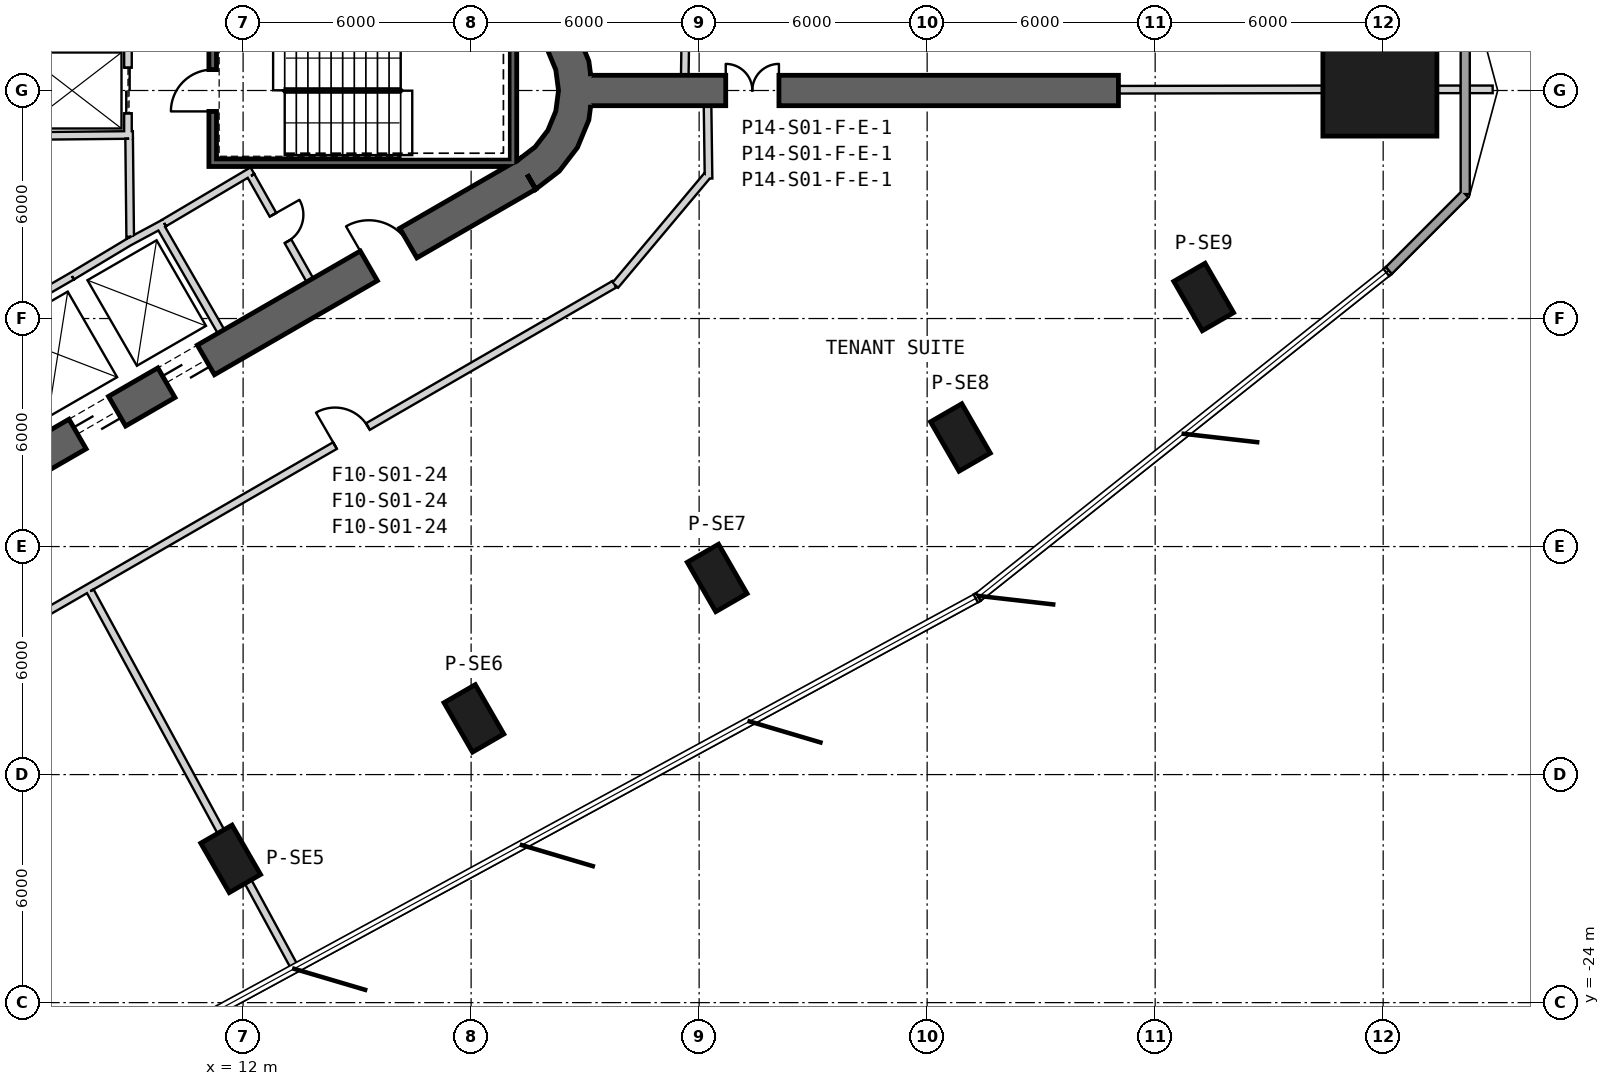
"""IFC4 building model, lengths in metres.
Left out: names, types, materials, properties, quantities, classifications, styles, units other than length and angle.
Written with IfcOpenShell. Run it as: python <this file> out.ifc"""

import sys

from ifc_helpers import new_model, si_unit, direction, frame, frame_2d, origin, origin_2d, place, context, subcontext, project, spatial, polyline, rectangle, outline, extrude, element, fill, save


model = new_model("IFC4")
c1 = context("Model", 3, precision=1e-05, world=origin(), true_north=direction((0.0, 1.0)))
c2 = subcontext(c1, "Body", "Model", "MODEL_VIEW")
j1 = project(units=[si_unit("LENGTHUNIT", "METRE"), si_unit("PLANEANGLEUNIT", "RADIAN")], contexts=[c1])
p1 = place(None, origin())
s1 = spatial("IfcSite", under=j1, at=p1, CompositionType="ELEMENT")
p2 = place(p1, origin())
s2 = spatial("IfcBuilding", under=s1, at=p2, CompositionType="ELEMENT")
p3 = place(p2, frame((0.0, 0.0, 57.8)))
s3 = spatial("IfcBuildingStorey", under=s2, at=p3, CompositionType="ELEMENT", Elevation=57.8)
p4 = place(p3, frame((41.914, 0.0, 0.0), z_axis=(0.0, 0.0, 1.0), x_axis=(1.0, 0.0, 0.0)))
e1 = element("IfcColumn", 1, at=p4, inside=s3, PredefinedType="COLUMN", context=c2, shape_type="SweptSolid", body=[
    extrude(rectangle(XDim=3.0, YDim=2.4, at=origin_2d()), origin(), (0.0, 0.0, 1.0), 4.1),
])
for number, where, z_axis, x_axis in (
    (2, (11.672, -20.217, 0.0), (0.0, 0.0, 1.0), (0.5, -0.866, 0.0)),
    (3, (18.073, -16.521, 0.0), (0.0, 0.0, 1.0), (0.5, -0.866, 0.0)),
    (4, (24.475, -12.825, 0.0), (0.0, 0.0, 1.0), (0.5, -0.866, 0.0)),
    (5, (30.876, -9.13, 0.0), (0.0, 0.0, 1.0), (0.5, -0.866, 0.0)),
    (6, (37.277, -5.434, 0.0), (0.0, 0.0, 1.0), (0.5, -0.866, 0.0)),
):
    element("IfcColumn", number, at=place(p3, frame(where, z_axis=z_axis, x_axis=x_axis)), inside=s3, PredefinedType="COLUMN", context=c2, shape_type="SweptSolid", body=[
        extrude(rectangle(XDim=1.5, YDim=0.95, at=origin_2d()), origin(), (0.0, 0.0, 1.0), 4.1),
    ])
p5 = place(p3, frame((-7.825, -17.97, 0.0), z_axis=(0.0, 0.0, 1.0), x_axis=(0.866028369851, 0.499994862586, 0.0)))
e7 = element("IfcWall", 7, at=p5, inside=s3, PredefinedType="SHEAR", context=c2, shape_type="SweptSolid", body=[
    extrude(rectangle(XDim=31.523, YDim=0.9, at=frame_2d((15.762, 0.0))), origin(), (0.0, 0.0, 1.0), 4.1),
])
p6 = place(p5, frame((7.062, 0.0, 0.0)))
e8 = element("IfcOpeningElement", 8, at=p6, cuts=e7, PredefinedType="OPENING", context=c2, shape_type="SweptSolid", body=[
    extrude(rectangle(XDim=1.2, YDim=2.4, at=frame_2d((0.6, 1.2))), frame((0.0, 0.46, 0.0), z_axis=(0.0, -1.0, 0.0), x_axis=(1.0, 0.0, 0.0)), (0.0, 0.0, 1.0), 0.92),
])
p7 = place(p5, frame((9.762, 0.0, 0.0)))
e9 = element("IfcOpeningElement", 9, at=p7, cuts=e7, PredefinedType="OPENING", context=c2, shape_type="SweptSolid", body=[
    extrude(rectangle(XDim=1.2, YDim=2.4, at=frame_2d((0.6, 1.2))), frame((0.0, 0.46, 0.0), z_axis=(0.0, -1.0, 0.0), x_axis=(1.0, 0.0, 0.0)), (0.0, 0.0, 1.0), 0.92),
])
p8 = place(p5, frame((12.462, 0.0, 0.0)))
e10 = element("IfcOpeningElement", 10, at=p8, cuts=e7, PredefinedType="OPENING", context=c2, shape_type="SweptSolid", body=[
    extrude(rectangle(XDim=1.2, YDim=2.4, at=frame_2d((0.6, 1.2))), frame((0.0, 0.46, 0.0), z_axis=(0.0, -1.0, 0.0), x_axis=(1.0, 0.0, 0.0)), (0.0, 0.0, 1.0), 0.92),
])
p9 = place(p5, frame((15.162, 0.0, 0.0)))
e11 = element("IfcOpeningElement", 11, at=p9, cuts=e7, PredefinedType="OPENING", context=c2, shape_type="SweptSolid", body=[
    extrude(rectangle(XDim=1.2, YDim=2.4, at=frame_2d((0.6, 1.2))), frame((0.0, 0.46, 0.0), z_axis=(0.0, -1.0, 0.0), x_axis=(1.0, 0.0, 0.0)), (0.0, 0.0, 1.0), 0.92),
])
p10 = place(p5, frame((17.862, 0.0, 0.0)))
e12 = element("IfcOpeningElement", 12, at=p10, cuts=e7, PredefinedType="OPENING", context=c2, shape_type="SweptSolid", body=[
    extrude(rectangle(XDim=1.2, YDim=2.4, at=frame_2d((0.6, 1.2))), frame((0.0, 0.46, 0.0), z_axis=(0.0, -1.0, 0.0), x_axis=(1.0, 0.0, 0.0)), (0.0, 0.0, 1.0), 0.92),
])
p11 = place(p5, frame((20.562, 0.0, 0.0)))
e13 = element("IfcOpeningElement", 13, at=p11, cuts=e7, PredefinedType="OPENING", context=c2, shape_type="SweptSolid", body=[
    extrude(rectangle(XDim=1.2, YDim=2.4, at=frame_2d((0.6, 1.2))), frame((0.0, 0.46, 0.0), z_axis=(0.0, -1.0, 0.0), x_axis=(1.0, 0.0, 0.0)), (0.0, 0.0, 1.0), 0.92),
])
p12 = place(p5, frame((26.712, 0.0, 0.0)))
e14 = element("IfcOpeningElement", 14, at=p12, cuts=e7, PredefinedType="OPENING", context=c2, shape_type="SweptSolid", body=[
    extrude(rectangle(XDim=1.2, YDim=2.4, at=frame_2d((0.6, 1.2))), frame((0.0, 0.46, 0.0), z_axis=(0.0, -1.0, 0.0), x_axis=(1.0, 0.0, 0.0)), (0.0, 0.0, 1.0), 0.92),
])
p13 = place(p5, frame((3.612, 0.0, 0.0)))
e15 = element("IfcOpeningElement", 15, at=p13, cuts=e7, PredefinedType="OPENING", context=c2, shape_type="SweptSolid", body=[
    extrude(rectangle(XDim=1.2, YDim=2.4, at=frame_2d((0.6, 1.2))), frame((0.0, 0.46, 0.0), z_axis=(0.0, -1.0, 0.0), x_axis=(1.0, 0.0, 0.0)), (0.0, 0.0, 1.0), 0.92),
])
p14 = place(p3, origin())
e16 = element("IfcWall", 16, at=p14, inside=s3, PredefinedType="SHEAR", context=c2, shape_type="SweptSolid", body=[
    extrude(outline(polyline([(19.7, -2.598), (20.321, -2.121), (20.798, -1.5), (21.098, -0.777), (21.2, 0.0), (21.098, 0.777), (20.798, 1.5), (20.321, 2.121), (19.7, 2.598), (19.25, 1.819), (19.685, 1.485), (20.019, 1.05), (20.229, 0.543), (20.3, 0.0), (20.229, -0.543), (20.019, -1.05), (19.685, -1.485), (19.25, -1.819), (19.7, -2.598)])), origin(), (0.0, 0.0, 1.0), 4.1),
])
p15 = place(p3, frame((21.15, 0.0, 0.0), z_axis=(0.0, 0.0, 1.0), x_axis=(1.0, 0.0, 0.0)))
e17 = element("IfcWall", 17, at=p15, inside=s3, PredefinedType="SHEAR", context=c2, shape_type="SweptSolid", body=[
    extrude(rectangle(XDim=13.884, YDim=0.8, at=frame_2d((6.942, 0.0))), origin(), (0.0, 0.0, 1.0), 4.1),
])
p16 = place(p15, frame((3.55, 0.0, 0.0)))
e18 = element("IfcOpeningElement", 18, at=p16, cuts=e17, PredefinedType="OPENING", context=c2, shape_type="SweptSolid", body=[
    extrude(rectangle(XDim=1.4, YDim=2.4, at=frame_2d((0.7, 1.2))), frame((0.0, 0.41, 0.0), z_axis=(0.0, -1.0, 0.0), x_axis=(1.0, 0.0, 0.0)), (0.0, 0.0, 1.0), 0.82),
])
p17 = place(p3, frame((42.146, -4.739, 0.0), z_axis=(0.0, 0.0, 1.0), x_axis=(0.707106781187, 0.707106781187, 0.0)))
e19 = element("IfcWall", 19, at=p17, inside=s3, PredefinedType="SOLIDWALL", context=c2, shape_type="SweptSolid", body=[
    extrude(rectangle(XDim=2.847, YDim=0.24, at=frame_2d((1.424, 0.0))), origin(), (0.0, 0.0, 1.0), 3.8),
])
p18 = place(p3, frame((44.159, -2.726, 0.0), z_axis=(0.0, 0.0, 1.0), x_axis=(0.0, 1.0, 0.0)))
e20 = element("IfcWall", 20, at=p18, inside=s3, PredefinedType="SOLIDWALL", context=c2, shape_type="SweptSolid", body=[
    extrude(rectangle(XDim=5.451, YDim=0.24, at=frame_2d((2.726, 0.0))), origin(), (0.0, 0.0, 1.0), 3.8),
])
p19 = place(p3, frame((0.483, -8.936, 0.0), z_axis=(0.0, 0.0, 1.0), x_axis=(0.866030989016, 0.499990325971, 0.0)))
e21 = element("IfcWall", 21, at=p19, inside=s3, PredefinedType="PLUMBINGWALL", context=c2, shape_type="SweptSolid", body=[
    extrude(rectangle(XDim=8.1, YDim=0.2, at=frame_2d((4.05, 0.0))), origin(), (0.0, 0.0, 1.0), 3.8),
])
p20 = place(p3, frame((9.795, -3.525, 0.0), z_axis=(0.0, 0.0, 1.0), x_axis=(0.499984717929, -0.866034226713, 0.0)))
e22 = element("IfcWall", 22, at=p20, inside=s3, PredefinedType="PLUMBINGWALL", context=c2, shape_type="SweptSolid", body=[
    extrude(rectangle(XDim=3.25, YDim=0.2, at=frame_2d((1.625, 0.0))), origin(), (0.0, 0.0, 1.0), 3.8),
])
p21 = place(p3, frame((8.974, -3.999, 0.0), z_axis=(0.0, 0.0, 1.0), x_axis=(0.880907015104, 0.473289373154, 0.0)))
e23 = element("IfcWall", 23, at=p21, inside=s3, PredefinedType="PLUMBINGWALL", context=c2, shape_type="SweptSolid", body=[
    extrude(rectangle(XDim=1.078, YDim=0.2, at=frame_2d((0.539, 0.0))), origin(), (0.0, 0.0, 1.0), 3.8),
])
p22 = place(p3, frame((7.497, -4.886, 0.0), z_axis=(0.0, 0.0, 1.0), x_axis=(0.857516281273, 0.51445682749, 0.0)))
e24 = element("IfcWall", 24, at=p22, inside=s3, PredefinedType="PLUMBINGWALL", context=c2, shape_type="SweptSolid", body=[
    extrude(rectangle(XDim=1.845, YDim=0.2, at=frame_2d((0.922, 0.0))), origin(), (0.0, 0.0, 1.0), 3.8),
])
p23 = place(p3, frame((19.1, -2.0, -0.3), z_axis=(0.0, 0.0, 1.0), x_axis=(0.0, 1.0, 0.0)))
e25 = element("IfcWall", 25, at=p23, inside=s3, PredefinedType="SHEAR", context=c2, shape_type="SweptSolid", body=[
    extrude(rectangle(XDim=3.8, YDim=0.2, at=frame_2d((1.9, 0.0))), origin(), (0.0, 0.0, 1.0), 4.1),
])
p24 = place(p3, frame((11.1, -1.9, -0.3), z_axis=(0.0, 0.0, 1.0), x_axis=(1.0, 0.0, 0.0)))
e26 = element("IfcWall", 26, at=p24, inside=s3, PredefinedType="SHEAR", context=c2, shape_type="SweptSolid", body=[
    extrude(rectangle(XDim=7.9, YDim=0.2, at=frame_2d((3.95, 0.0))), origin(), (0.0, 0.0, 1.0), 4.1),
])
p25 = place(p3, frame((11.2, -1.8, -0.3), z_axis=(0.0, 0.0, 1.0), x_axis=(0.0, 1.0, 0.0)))
e27 = element("IfcWall", 27, at=p25, inside=s3, PredefinedType="SHEAR", context=c2, shape_type="SweptSolid", body=[
    extrude(rectangle(XDim=3.6, YDim=0.2, at=frame_2d((1.8, 0.0))), origin(), (0.0, 0.0, 1.0), 4.1),
])
p26 = place(p25, frame((1.25, 0.0, 0.3)))
e28 = element("IfcOpeningElement", 28, at=p26, cuts=e27, PredefinedType="OPENING", context=c2, shape_type="SweptSolid", body=[
    extrude(rectangle(XDim=1.1, YDim=2.1, at=frame_2d((0.55, 1.05))), frame((0.0, 0.11, 0.0), z_axis=(0.0, -1.0, 0.0), x_axis=(1.0, 0.0, 0.0)), (0.0, 0.0, 1.0), 0.22),
])
p27 = place(p3, frame((8.97, 1.2, 0.0), z_axis=(0.0, 0.0, 1.0), x_axis=(0.0, -1.0, 0.0)))
e29 = element("IfcWall", 29, at=p27, inside=s3, PredefinedType="PLUMBINGWALL", context=c2, shape_type="SweptSolid", body=[
    extrude(rectangle(XDim=2.4, YDim=0.2, at=frame_2d((1.2, 0.0))), origin(), (0.0, 0.0, 1.0), 3.8),
])
p28 = place(p27, frame((0.6, 0.0, 0.0)))
e30 = element("IfcOpeningElement", 30, at=p28, cuts=e29, PredefinedType="OPENING", context=c2, shape_type="SweptSolid", body=[
    extrude(rectangle(XDim=1.2, YDim=2.4, at=frame_2d((0.6, 1.2))), frame((0.0, 0.11, 0.0), z_axis=(0.0, -1.0, 0.0), x_axis=(1.0, 0.0, 0.0)), (0.0, 0.0, 1.0), 0.22),
])
p29 = place(p3, frame((9.1, -1.169, 0.0), z_axis=(0.0, 0.0, 1.0), x_axis=(-0.999949988, -0.010001074852, 0.0)))
e31 = element("IfcWall", 31, at=p29, inside=s3, PredefinedType="PLUMBINGWALL", context=c2, shape_type="SweptSolid", body=[
    extrude(rectangle(XDim=3.1, YDim=0.2, at=frame_2d((1.55, 0.0))), origin(), (0.0, 0.0, 1.0), 3.8),
])
p30 = place(p3, frame((12.245, -2.109, 0.0), z_axis=(0.0, 0.0, 1.0), x_axis=(-0.860414880418, -0.509594185166, 0.0)))
e32 = element("IfcWall", 32, at=p30, inside=s3, PredefinedType="PARTITIONING", context=c2, shape_type="SweptSolid", body=[
    extrude(rectangle(XDim=2.7, YDim=0.2, at=frame_2d((1.35, 0.0))), origin(), (0.0, 0.0, 1.0), 3.8),
])
p31 = place(p3, frame((13.758, -4.99, 0.0), z_axis=(0.0, 0.0, 1.0), x_axis=(-0.491993409184, 0.87059892334, 0.0)))
e33 = element("IfcWall", 33, at=p31, inside=s3, PredefinedType="PARTITIONING", context=c2, shape_type="SweptSolid", body=[
    extrude(rectangle(XDim=3.15, YDim=0.2, at=frame_2d((1.575, 0.0))), origin(), (0.0, 0.0, 1.0), 3.8),
])
p32 = place(p31, frame((1.175, 0.0, 0.0)))
e34 = element("IfcOpeningElement", 34, at=p32, cuts=e33, PredefinedType="OPENING", context=c2, shape_type="SweptSolid", body=[
    extrude(rectangle(XDim=0.8, YDim=2.1, at=frame_2d((0.4, 1.05))), frame((0.0, 0.11, 0.0), z_axis=(0.0, -1.0, 0.0), x_axis=(1.0, 0.0, 0.0)), (0.0, 0.0, 1.0), 0.22),
])
p33 = place(p3, frame((9.029, -3.851, 0.0), z_axis=(0.0, 0.0, 1.0), x_axis=(-0.010784614026, 0.999941844359, 0.0)))
e35 = element("IfcWall", 35, at=p33, inside=s3, PredefinedType="PARTITIONING", context=c2, shape_type="SweptSolid", body=[
    extrude(rectangle(XDim=2.581, YDim=0.2, at=frame_2d((1.291, 0.0))), origin(), (0.0, 0.0, 1.0), 3.8),
])
p34 = place(p3, frame((23.622, 0.4, 0.0), z_axis=(0.0, 0.0, 1.0), x_axis=(0.015125657972, 0.999885600692, 0.0)))
e36 = element("IfcWall", 36, at=p34, inside=s3, PredefinedType="PARTITIONING", context=c2, shape_type="SweptSolid", body=[
    extrude(rectangle(XDim=1.533, YDim=0.2, at=frame_2d((0.767, 0.0))), origin(), (0.0, 0.0, 1.0), 3.8),
])
p35 = place(p3, frame((24.248, -2.317, 0.0), z_axis=(0.0, 0.0, 1.0), x_axis=(-0.013627571522, 0.999907140336, 0.0)))
e37 = element("IfcWall", 37, at=p35, inside=s3, PredefinedType="PARTITIONING", context=c2, shape_type="SweptSolid", body=[
    extrude(rectangle(XDim=1.917, YDim=0.2, at=frame_2d((0.958, 0.0))), origin(), (0.0, 0.0, 1.0), 3.8),
])
p36 = place(p3, frame((21.793, -5.124, 0.0), z_axis=(0.0, 0.0, 1.0), x_axis=(0.642787733653, 0.766044339098, 0.0)))
e38 = element("IfcWall", 38, at=p36, inside=s3, PredefinedType="PARTITIONING", context=c2, shape_type="SweptSolid", body=[
    extrude(rectangle(XDim=3.767, YDim=0.2, at=frame_2d((1.884, 0.0))), origin(), (0.0, 0.0, 1.0), 2.88),
])
p37 = place(p3, frame((-6.644, -21.503, 0.0), z_axis=(0.0, 0.0, 1.0), x_axis=(0.866025615729, 0.499999632902, 0.0)))
e39 = element("IfcWall", 39, at=p37, inside=s3, PredefinedType="PARTITIONING", context=c2, shape_type="SweptSolid", body=[
    extrude(rectangle(XDim=32.811, YDim=0.2, at=frame_2d((16.405, 0.0))), origin(), (0.0, 0.0, 1.0), 2.98),
])
p38 = place(p37, frame((24.32, 0.0, 0.0)))
e40 = element("IfcOpeningElement", 40, at=p38, cuts=e39, PredefinedType="OPENING", context=c2, shape_type="SweptSolid", body=[
    extrude(rectangle(XDim=1.0, YDim=2.1, at=frame_2d((0.5, 1.05))), frame((0.0, 0.11, 0.0), z_axis=(0.0, -1.0, 0.0), x_axis=(1.0, 0.0, 0.0)), (0.0, 0.0, 1.0), 0.22),
])
p39 = place(p37, frame((7.965, 0.0, 0.0)))
e41 = element("IfcOpeningElement", 41, at=p39, cuts=e39, PredefinedType="OPENING", context=c2, shape_type="SweptSolid", body=[
    extrude(rectangle(XDim=1.0, YDim=2.1, at=frame_2d((0.5, 1.05))), frame((0.0, 0.11, 0.0), z_axis=(0.0, -1.0, 0.0), x_axis=(1.0, 0.0, 0.0)), (0.0, 0.0, 1.0), 0.22),
])
p40 = place(p3, frame((35.034, 0.02, 0.0), z_axis=(0.0, 0.0, 1.0), x_axis=(0.999998268947, 0.001860672976, 0.0)))
e42 = element("IfcWall", 42, at=p40, inside=s3, PredefinedType="PARTITIONING", context=c2, shape_type="SweptSolid", body=[
    extrude(rectangle(XDim=5.38, YDim=0.2, at=frame_2d((2.69, 0.0))), origin(), (0.0, 0.0, 1.0), 3.37),
])
p41 = place(p3, frame((43.414, 0.03, 0.0), z_axis=(0.0, 0.0, 1.0), x_axis=(1.0, 0.0, 0.0)))
e43 = element("IfcWall", 43, at=p41, inside=s3, PredefinedType="PARTITIONING", context=c2, shape_type="SweptSolid", body=[
    extrude(rectangle(XDim=0.625, YDim=0.2, at=frame_2d((0.313, 0.0))), origin(), (0.0, 0.0, 1.0), 3.8),
])
p42 = place(p3, frame((44.279, 0.03, 0.0), z_axis=(0.0, 0.0, 1.0), x_axis=(1.0, 0.0, 0.0)))
e44 = element("IfcWall", 44, at=p42, inside=s3, PredefinedType="PARTITIONING", context=c2, shape_type="SweptSolid", body=[
    extrude(rectangle(XDim=0.602, YDim=0.2, at=frame_2d((0.301, 0.0))), origin(), (0.0, 0.0, 1.0), 3.8),
])
p43 = place(p3, frame((7.979, -13.176, 0.0), z_axis=(0.0, 0.0, 1.0), x_axis=(0.477371038841, -0.878701821596, 0.0)))
e45 = element("IfcWall", 45, at=p43, inside=s3, PredefinedType="PARTITIONING", context=c2, shape_type="SweptSolid", body=[
    extrude(rectangle(XDim=11.289, YDim=0.2, at=frame_2d((5.645, 0.0))), origin(), (0.0, 0.0, 1.0), 3.08),
])
p44 = place(p26, origin())
e46 = element("IfcDoor", 46, at=p44, inside=s3, OperationType="SINGLE_SWING_LEFT", PredefinedType="USERDEFINED", context=c2, shape_type="SweptSolid", body=[
    extrude(rectangle(XDim=1.1, YDim=2.1, at=frame_2d((0.55, 1.05))), frame((0.0, 0.025, 0.0), z_axis=(0.0, -1.0, 0.0), x_axis=(1.0, 0.0, 0.0)), (0.0, 0.0, 1.0), 0.05),
])
fill(e28, e46)
p45 = place(p28, origin())
e47 = element("IfcDoor", 47, at=p45, inside=s3, OperationType="SLIDING_TO_LEFT", PredefinedType="USERDEFINED", context=c2, shape_type="SweptSolid", body=[
    extrude(rectangle(XDim=1.2, YDim=2.4, at=frame_2d((0.6, 1.2))), frame((0.0, 0.025, 0.0), z_axis=(0.0, -1.0, 0.0), x_axis=(1.0, 0.0, 0.0)), (0.0, 0.0, 1.0), 0.05),
])
fill(e30, e47)
p46 = place(p32, origin())
e48 = element("IfcDoor", 48, at=p46, inside=s3, OperationType="SINGLE_SWING_LEFT", PredefinedType="USERDEFINED", context=c2, shape_type="SweptSolid", body=[
    extrude(rectangle(XDim=0.8, YDim=2.1, at=frame_2d((0.4, 1.05))), frame((0.0, 0.025, 0.0), z_axis=(0.0, -1.0, 0.0), x_axis=(1.0, 0.0, 0.0)), (0.0, 0.0, 1.0), 0.05),
])
fill(e34, e48)
p47 = place(p38, origin())
e49 = element("IfcDoor", 49, at=p47, inside=s3, OperationType="SINGLE_SWING_RIGHT", PredefinedType="USERDEFINED", context=c2, shape_type="SweptSolid", body=[
    extrude(rectangle(XDim=1.0, YDim=2.1, at=frame_2d((0.5, 1.05))), frame((0.0, 0.025, 0.0), z_axis=(0.0, -1.0, 0.0), x_axis=(1.0, 0.0, 0.0)), (0.0, 0.0, 1.0), 0.05),
])
fill(e40, e49)
p48 = place(p10, origin())
e50 = element("IfcDoor", 50, at=p48, inside=s3, OperationType="SLIDING_TO_LEFT", PredefinedType="USERDEFINED", context=c2, shape_type="SweptSolid", body=[
    extrude(rectangle(XDim=1.2, YDim=2.4, at=frame_2d((0.6, 1.2))), frame((0.0, 0.025, 0.0), z_axis=(0.0, -1.0, 0.0), x_axis=(1.0, 0.0, 0.0)), (0.0, 0.0, 1.0), 0.05),
])
fill(e12, e50)
p49 = place(p11, origin())
e51 = element("IfcDoor", 51, at=p49, inside=s3, OperationType="SLIDING_TO_LEFT", PredefinedType="USERDEFINED", context=c2, shape_type="SweptSolid", body=[
    extrude(rectangle(XDim=1.2, YDim=2.4, at=frame_2d((0.6, 1.2))), frame((0.0, 0.025, 0.0), z_axis=(0.0, -1.0, 0.0), x_axis=(1.0, 0.0, 0.0)), (0.0, 0.0, 1.0), 0.05),
])
fill(e13, e51)
p50 = place(p12, origin())
e52 = element("IfcDoor", 52, at=p50, inside=s3, OperationType="SINGLE_SWING_RIGHT", PredefinedType="USERDEFINED", context=c2, shape_type="SweptSolid", body=[
    extrude(rectangle(XDim=1.2, YDim=2.4, at=frame_2d((0.6, 1.2))), frame((0.0, 0.025, 0.0), z_axis=(0.0, -1.0, 0.0), x_axis=(1.0, 0.0, 0.0)), (0.0, 0.0, 1.0), 0.05),
])
fill(e14, e52)
p51 = place(p16, origin())
e53 = element("IfcDoor", 53, at=p51, inside=s3, OperationType="DOUBLE_DOOR_SINGLE_SWING", PredefinedType="NOTDEFINED", context=c2, shape_type="SweptSolid", body=[
    extrude(rectangle(XDim=1.4, YDim=2.4, at=frame_2d((0.7, 1.2))), frame((0.0, 0.025, 0.0), z_axis=(0.0, -1.0, 0.0), x_axis=(1.0, 0.0, 0.0)), (0.0, 0.0, 1.0), 0.05),
])
fill(e18, e53)
save(model, sys.argv[1])
